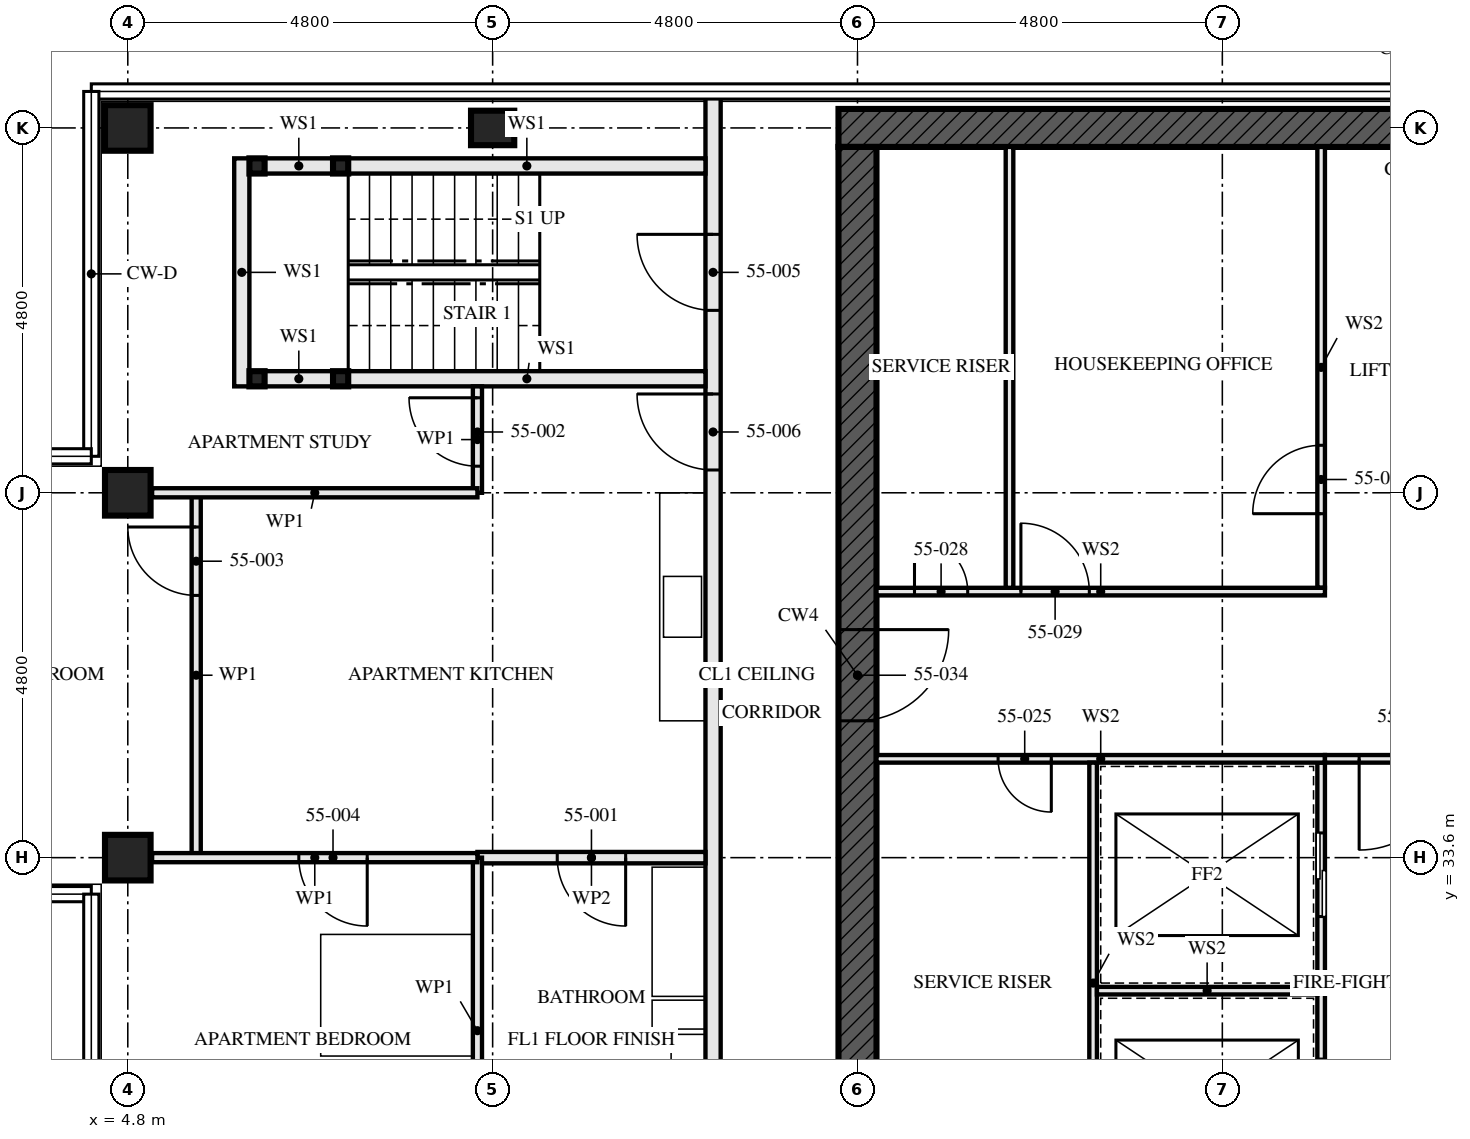
"""IFC4 building model, lengths in metres.
Left out: names, types, materials, properties, quantities, classifications, styles, units other than length and angle.
Written with IfcOpenShell. Run it as: python <this file> out.ifc"""

import sys

from ifc_helpers import new_model, si_unit, direction, frame, frame_2d, origin, origin_2d, place, context, subcontext, project, spatial, rectangle, hollow_rectangle, i_section, extrude, element, fill, save


model = new_model("IFC4")
c1 = context("Model", 3, precision=1e-05, world=origin(), true_north=direction((0.0, 1.0)))
c2 = subcontext(c1, "Body", "Model", "MODEL_VIEW")
j1 = project(units=[si_unit("LENGTHUNIT", "METRE"), si_unit("PLANEANGLEUNIT", "RADIAN")], contexts=[c1])
p1 = place(None, origin())
s1 = spatial("IfcSite", under=j1, at=p1, CompositionType="ELEMENT")
p2 = place(p1, origin())
s2 = spatial("IfcBuilding", under=s1, at=p2, CompositionType="ELEMENT")
p3 = place(p2, frame((0.0, 0.0, 201.5)))
s3 = spatial("IfcBuildingStorey", under=s2, at=p3, CompositionType="ELEMENT", Elevation=201.5)
for number, where, z_axis, x_axis in (
    (1, (4.8, 33.6, 0.0), (0.0, 0.0, 1.0), (0.0, 1.0, 0.0)),
    (2, (4.8, 38.4, 0.0), (0.0, 0.0, 1.0), (0.0, 1.0, 0.0)),
    (3, (4.8, 43.2, 0.0), (0.0, 0.0, 1.0), (0.0, 1.0, 0.0)),
):
    element("IfcColumn", number, at=place(p3, frame(where, z_axis=z_axis, x_axis=x_axis)), inside=s3, PredefinedType="COLUMN", context=c2, shape_type="SweptSolid", body=[
        extrude(hollow_rectangle(XDim=0.6, YDim=0.6, WallThickness=0.05, at=origin_2d()), origin(), (0.0, 0.0, 1.0), 3.5),
    ])
p4 = place(p3, frame((9.6, 43.2, 0.0), z_axis=(0.0, 0.0, 1.0), x_axis=(0.0, 1.0, 0.0)))
e4 = element("IfcColumn", 4, at=p4, inside=s3, PredefinedType="COLUMN", context=c2, shape_type="SweptSolid", body=[
    extrude(i_section(OverallWidth=0.454, OverallDepth=0.569, WebThickness=0.078, FlangeThickness=0.125, FilletRadius=0.015, at=origin_2d()), origin(), (0.0, 0.0, 1.0), 3.5),
])
p5 = place(p3, frame((29.05, 43.2, -0.17), z_axis=(0.0, 0.0, 1.0), x_axis=(-1.0, 0.0, 0.0)))
e5 = element("IfcWall", 5, at=p5, inside=s3, PredefinedType="SHEAR", context=c2, shape_type="SweptSolid", body=[
    extrude(rectangle(XDim=14.9, YDim=0.5, at=frame_2d((7.45, 0.0))), origin(), (0.0, 0.0, 1.0), 3.5),
])
p6 = place(p3, frame((14.4, 42.95, -0.17), z_axis=(0.0, 0.0, 1.0), x_axis=(0.0, -1.0, 0.0)))
e6 = element("IfcWall", 6, at=p6, inside=s3, PredefinedType="SHEAR", context=c2, shape_type="SweptSolid", body=[
    extrude(rectangle(XDim=13.9, YDim=0.5, at=frame_2d((6.95, 0.0))), origin(), (0.0, 0.0, 1.0), 3.5),
])
p7 = place(p6, frame((6.35, 0.0, 0.17)))
e7 = element("IfcOpeningElement", 7, at=p7, cuts=e6, PredefinedType="OPENING", context=c2, shape_type="SweptSolid", body=[
    extrude(rectangle(XDim=1.2, YDim=2.1, at=frame_2d((0.6, 1.05))), frame((0.0, 0.26, 0.0), z_axis=(0.0, -1.0, 0.0), x_axis=(1.0, 0.0, 0.0)), (0.0, 0.0, 1.0), 0.521),
])
for number, where, z_axis, x_axis in (
    (8, (6.5, 42.7, 0.0), (0.0, 0.0, 1.0), (1.0, 0.0, 0.0)),
    (9, (6.5, 39.9, 0.0), (0.0, 0.0, 1.0), (1.0, 0.0, 0.0)),
    (10, (7.6, 42.7, 0.0), (0.0, 0.0, 1.0), (1.0, 0.0, 0.0)),
    (11, (7.6, 39.9, 0.0), (0.0, 0.0, 1.0), (1.0, 0.0, 0.0)),
):
    element("IfcColumn", number, at=place(p3, frame(where, z_axis=z_axis, x_axis=x_axis)), inside=s3, PredefinedType="COLUMN", context=c2, shape_type="SweptSolid", body=[
        extrude(hollow_rectangle(XDim=0.2, YDim=0.2, WallThickness=0.008, at=origin_2d()), origin(), (0.0, 0.0, 1.0), 3.33),
    ])
p8 = place(p3, frame((6.6, 42.7, 0.0), z_axis=(0.0, 0.0, 1.0), x_axis=(1.0, 0.0, 0.0)))
e12 = element("IfcWall", 12, at=p8, inside=s3, PredefinedType="SOLIDWALL", context=c2, shape_type="SweptSolid", body=[
    extrude(rectangle(XDim=0.9, YDim=0.2, at=frame_2d((0.45, 0.0))), origin(), (0.0, 0.0, 1.0), 2.99),
])
p9 = place(p3, frame((7.7, 42.7, 0.0), z_axis=(0.0, 0.0, 1.0), x_axis=(1.0, 0.0, 0.0)))
e13 = element("IfcWall", 13, at=p9, inside=s3, PredefinedType="SOLIDWALL", context=c2, shape_type="SweptSolid", body=[
    extrude(rectangle(XDim=4.7, YDim=0.2, at=frame_2d((2.35, 0.0))), origin(), (0.0, 0.0, 1.0), 2.99),
])
p10 = place(p3, frame((6.6, 39.9, 0.0), z_axis=(0.0, 0.0, 1.0), x_axis=(1.0, 0.0, 0.0)))
e14 = element("IfcWall", 14, at=p10, inside=s3, PredefinedType="SOLIDWALL", context=c2, shape_type="SweptSolid", body=[
    extrude(rectangle(XDim=0.9, YDim=0.2, at=frame_2d((0.45, 0.0))), origin(), (0.0, 0.0, 1.0), 2.99),
])
p11 = place(p3, frame((7.7, 39.9, 0.0), z_axis=(0.0, 0.0, 1.0), x_axis=(1.0, 0.0, 0.0)))
e15 = element("IfcWall", 15, at=p11, inside=s3, PredefinedType="SOLIDWALL", context=c2, shape_type="SweptSolid", body=[
    extrude(rectangle(XDim=4.7, YDim=0.2, at=frame_2d((2.35, 0.0))), origin(), (0.0, 0.0, 1.0), 2.99),
])
p12 = place(p3, frame((6.3, 42.8, 0.0), z_axis=(0.0, 0.0, 1.0), x_axis=(0.0, -1.0, 0.0)))
e16 = element("IfcWall", 16, at=p12, inside=s3, PredefinedType="SOLIDWALL", context=c2, shape_type="SweptSolid", body=[
    extrude(rectangle(XDim=3.0, YDim=0.2, at=frame_2d((1.5, 0.0))), origin(), (0.0, 0.0, 1.0), 3.33),
])
p13 = place(p3, frame((9.4, 33.6, 0.0), z_axis=(0.0, 0.0, 1.0), x_axis=(1.0, 0.0, 0.0)))
e17 = element("IfcWall", 17, at=p13, inside=s3, PredefinedType="PARTITIONING", context=c2, shape_type="SweptSolid", body=[
    extrude(rectangle(XDim=3.0, YDim=0.15, at=frame_2d((1.5, 0.0))), origin(), (0.0, 0.0, 1.0), 2.55),
])
p14 = place(p13, frame((1.05, 0.0, 0.0)))
e18 = element("IfcOpeningElement", 18, at=p14, cuts=e17, PredefinedType="OPENING", context=c2, shape_type="SweptSolid", body=[
    extrude(rectangle(XDim=0.9, YDim=2.1, at=frame_2d((0.45, 1.05))), frame((0.0, 0.085, 0.0), z_axis=(0.0, -1.0, 0.0), x_axis=(1.0, 0.0, 0.0)), (0.0, 0.0, 1.0), 0.171),
])
p15 = place(p3, frame((9.4, 39.8, 0.0), z_axis=(0.0, 0.0, 1.0), x_axis=(0.0, -1.0, 0.0)))
e19 = element("IfcWall", 19, at=p15, inside=s3, PredefinedType="PARTITIONING", context=c2, shape_type="SweptSolid", body=[
    extrude(rectangle(XDim=1.4, YDim=0.12, at=frame_2d((0.7, 0.0))), origin(), (0.0, 0.0, 1.0), 3.33),
])
p16 = place(p15, frame((0.15, 0.0, 0.0)))
e20 = element("IfcOpeningElement", 20, at=p16, cuts=e19, PredefinedType="OPENING", context=c2, shape_type="SweptSolid", body=[
    extrude(rectangle(XDim=0.9, YDim=2.1, at=frame_2d((0.45, 1.05))), frame((0.0, 0.071, 0.0), z_axis=(0.0, -1.0, 0.0), x_axis=(1.0, 0.0, 0.0)), (0.0, 0.0, 1.0), 0.141),
])
p17 = place(p3, frame((5.7, 38.4, 0.0), z_axis=(0.0, 0.0, 1.0), x_axis=(0.0, -1.0, 0.0)))
e21 = element("IfcWall", 21, at=p17, inside=s3, PredefinedType="PARTITIONING", context=c2, shape_type="SweptSolid", body=[
    extrude(rectangle(XDim=4.8, YDim=0.12, at=frame_2d((2.4, 0.0))), origin(), (0.0, 0.0, 1.0), 3.33),
])
p18 = place(p17, frame((0.45, 0.0, 0.0)))
e22 = element("IfcOpeningElement", 22, at=p18, cuts=e21, PredefinedType="OPENING", context=c2, shape_type="SweptSolid", body=[
    extrude(rectangle(XDim=0.9, YDim=2.1, at=frame_2d((0.45, 1.05))), frame((0.0, 0.071, 0.0), z_axis=(0.0, -1.0, 0.0), x_axis=(1.0, 0.0, 0.0)), (0.0, 0.0, 1.0), 0.141),
])
p19 = place(p3, frame((9.4, 33.6, 0.0), z_axis=(0.0, 0.0, 1.0), x_axis=(0.0, -1.0, 0.0)))
e23 = element("IfcWall", 23, at=p19, inside=s3, PredefinedType="PARTITIONING", context=c2, shape_type="SweptSolid", body=[
    extrude(rectangle(XDim=4.553, YDim=0.12, at=frame_2d((2.276, 0.0))), origin(), (0.0, 0.0, 1.0), 3.33),
])
p20 = place(p3, frame((5.12, 38.4, 0.0), z_axis=(0.0, 0.0, 1.0), x_axis=(1.0, 0.0, 0.0)))
e24 = element("IfcWall", 24, at=p20, inside=s3, PredefinedType="PARTITIONING", context=c2, shape_type="SweptSolid", body=[
    extrude(rectangle(XDim=4.28, YDim=0.12, at=frame_2d((2.14, 0.0))), origin(), (0.0, 0.0, 1.0), 2.55),
])
p21 = place(p3, frame((5.12, 33.6, 0.0), z_axis=(0.0, 0.0, 1.0), x_axis=(1.0, 0.0, 0.0)))
e25 = element("IfcWall", 25, at=p21, inside=s3, PredefinedType="PARTITIONING", context=c2, shape_type="SweptSolid", body=[
    extrude(rectangle(XDim=4.28, YDim=0.12, at=frame_2d((2.14, 0.0))), origin(), (0.0, 0.0, 1.0), 2.55),
])
p22 = place(p21, frame((1.93, 0.0, 0.0)))
e26 = element("IfcOpeningElement", 26, at=p22, cuts=e25, PredefinedType="OPENING", context=c2, shape_type="SweptSolid", body=[
    extrude(rectangle(XDim=0.9, YDim=2.1, at=frame_2d((0.45, 1.05))), frame((0.0, 0.071, 0.0), z_axis=(0.0, -1.0, 0.0), x_axis=(1.0, 0.0, 0.0)), (0.0, 0.0, 1.0), 0.141),
])
p23 = place(p3, frame((12.5, 43.655, 0.0), z_axis=(0.0, 0.0, 1.0), x_axis=(0.0, -1.0, 0.0)))
e27 = element("IfcWall", 27, at=p23, inside=s3, PredefinedType="PARTITIONING", context=c2, shape_type="SweptSolid", body=[
    extrude(rectangle(XDim=15.31, YDim=0.2, at=frame_2d((7.655, 0.0))), origin(), (0.0, 0.0, 1.0), 2.32),
])
p24 = place(p23, frame((1.855, 0.0, 0.0)))
e28 = element("IfcOpeningElement", 28, at=p24, cuts=e27, PredefinedType="OPENING", context=c2, shape_type="SweptSolid", body=[
    extrude(rectangle(XDim=1.0, YDim=2.1, at=frame_2d((0.5, 1.05))), frame((0.0, 0.111, 0.0), z_axis=(0.0, -1.0, 0.0), x_axis=(1.0, 0.0, 0.0)), (0.0, 0.0, 1.0), 0.221),
])
p25 = place(p23, frame((3.955, 0.0, 0.0)))
e29 = element("IfcOpeningElement", 29, at=p25, cuts=e27, PredefinedType="OPENING", context=c2, shape_type="SweptSolid", body=[
    extrude(rectangle(XDim=1.0, YDim=2.1, at=frame_2d((0.5, 1.05))), frame((0.0, 0.111, 0.0), z_axis=(0.0, -1.0, 0.0), x_axis=(1.0, 0.0, 0.0)), (0.0, 0.0, 1.0), 0.221),
])
p26 = place(p3, frame((16.4, 37.15, 0.0), z_axis=(0.0, 0.0, 1.0), x_axis=(0.0, 1.0, 0.0)))
e30 = element("IfcWall", 30, at=p26, inside=s3, PredefinedType="SOLIDWALL", context=c2, shape_type="SweptSolid", body=[
    extrude(rectangle(XDim=5.8, YDim=0.1, at=frame_2d((2.9, 0.0))), origin(), (0.0, 0.0, 1.0), 3.33),
])
p27 = place(p3, frame((20.5, 29.05, 0.0), z_axis=(0.0, 0.0, 1.0), x_axis=(0.0, 1.0, 0.0)))
e31 = element("IfcWall", 31, at=p27, inside=s3, PredefinedType="SOLIDWALL", context=c2, shape_type="SweptSolid", body=[
    extrude(rectangle(XDim=5.8, YDim=0.1, at=frame_2d((2.9, 0.0))), origin(), (0.0, 0.0, 1.0), 3.33),
])
p28 = place(p27, frame((0.8, 0.0, 0.0)))
e32 = element("IfcOpeningElement", 32, at=p28, cuts=e31, PredefinedType="OPENING", context=c2, shape_type="SweptSolid", body=[
    extrude(rectangle(XDim=1.1, YDim=2.3, at=frame_2d((0.55, 1.15))), frame((0.0, 0.061, 0.0), z_axis=(0.0, -1.0, 0.0), x_axis=(1.0, 0.0, 0.0)), (0.0, 0.0, 1.0), 0.121),
])
p29 = place(p27, frame((3.775, 0.0, 0.0)))
e33 = element("IfcOpeningElement", 33, at=p29, cuts=e31, PredefinedType="OPENING", context=c2, shape_type="SweptSolid", body=[
    extrude(rectangle(XDim=1.1, YDim=2.3, at=frame_2d((0.55, 1.15))), frame((0.0, 0.061, 0.0), z_axis=(0.0, -1.0, 0.0), x_axis=(1.0, 0.0, 0.0)), (0.0, 0.0, 1.0), 0.121),
])
p30 = place(p3, frame((20.5, 37.15, 0.0), z_axis=(0.0, 0.0, 1.0), x_axis=(0.0, 1.0, 0.0)))
e34 = element("IfcWall", 34, at=p30, inside=s3, PredefinedType="SOLIDWALL", context=c2, shape_type="SweptSolid", body=[
    extrude(rectangle(XDim=5.8, YDim=0.1, at=frame_2d((2.9, 0.0))), origin(), (0.0, 0.0, 1.0), 3.33),
])
p31 = place(p30, frame((0.975, 0.0, 0.0)))
e35 = element("IfcOpeningElement", 35, at=p31, cuts=e34, PredefinedType="OPENING", context=c2, shape_type="SweptSolid", body=[
    extrude(rectangle(XDim=0.9, YDim=2.1, at=frame_2d((0.45, 1.05))), frame((0.0, 0.061, 0.0), z_axis=(0.0, -1.0, 0.0), x_axis=(1.0, 0.0, 0.0)), (0.0, 0.0, 1.0), 0.121),
])
p32 = place(p3, frame((14.65, 34.9, 0.0), z_axis=(0.0, 0.0, 1.0), x_axis=(1.0, 0.0, 0.0)))
e36 = element("IfcWall", 36, at=p32, inside=s3, PredefinedType="SOLIDWALL", context=c2, shape_type="SweptSolid", body=[
    extrude(rectangle(XDim=5.9, YDim=0.1, at=frame_2d((2.95, 0.0))), origin(), (0.0, 0.0, 1.0), 3.33),
])
p33 = place(p32, frame((1.6, 0.0, 0.0)))
e37 = element("IfcOpeningElement", 37, at=p33, cuts=e36, PredefinedType="OPENING", context=c2, shape_type="SweptSolid", body=[
    extrude(rectangle(XDim=0.7, YDim=2.1, at=frame_2d((0.35, 1.05))), frame((0.0, 0.061, 0.0), z_axis=(0.0, -1.0, 0.0), x_axis=(1.0, 0.0, 0.0)), (0.0, 0.0, 1.0), 0.121),
])
p34 = place(p3, frame((14.65, 37.1, 0.0), z_axis=(0.0, 0.0, 1.0), x_axis=(1.0, 0.0, 0.0)))
e38 = element("IfcWall", 38, at=p34, inside=s3, PredefinedType="SOLIDWALL", context=c2, shape_type="SweptSolid", body=[
    extrude(rectangle(XDim=5.9, YDim=0.1, at=frame_2d((2.95, 0.0))), origin(), (0.0, 0.0, 1.0), 3.33),
])
p35 = place(p34, frame((0.5, 0.0, 0.0)))
e39 = element("IfcOpeningElement", 39, at=p35, cuts=e38, PredefinedType="OPENING", context=c2, shape_type="SweptSolid", body=[
    extrude(rectangle(XDim=0.7, YDim=2.1, at=frame_2d((0.35, 1.05))), frame((0.0, 0.061, 0.0), z_axis=(0.0, -1.0, 0.0), x_axis=(1.0, 0.0, 0.0)), (0.0, 0.0, 1.0), 0.121),
])
p36 = place(p34, frame((1.9, 0.0, 0.0)))
e40 = element("IfcOpeningElement", 40, at=p36, cuts=e38, PredefinedType="OPENING", context=c2, shape_type="SweptSolid", body=[
    extrude(rectangle(XDim=0.9, YDim=2.1, at=frame_2d((0.45, 1.05))), frame((0.0, 0.061, 0.0), z_axis=(0.0, -1.0, 0.0), x_axis=(1.0, 0.0, 0.0)), (0.0, 0.0, 1.0), 0.121),
])
p37 = place(p3, frame((20.55, 34.9, 0.0), z_axis=(0.0, 0.0, 1.0), x_axis=(1.0, 0.0, 0.0)))
e41 = element("IfcWall", 41, at=p37, inside=s3, PredefinedType="SOLIDWALL", context=c2, shape_type="SweptSolid", body=[
    extrude(rectangle(XDim=2.5, YDim=0.1, at=frame_2d((1.25, 0.0))), origin(), (0.0, 0.0, 1.0), 3.33),
])
p38 = place(p37, frame((0.45, 0.0, 0.0)))
e42 = element("IfcOpeningElement", 42, at=p38, cuts=e41, PredefinedType="OPENING", context=c2, shape_type="SweptSolid", body=[
    extrude(rectangle(XDim=1.2, YDim=2.1, at=frame_2d((0.6, 1.05))), frame((0.0, 0.061, 0.0), z_axis=(0.0, -1.0, 0.0), x_axis=(1.0, 0.0, 0.0)), (0.0, 0.0, 1.0), 0.121),
])
p39 = place(p3, frame((17.5, 29.05, 0.0), z_axis=(0.0, 0.0, 1.0), x_axis=(0.0, 1.0, 0.0)))
e43 = element("IfcWall", 43, at=p39, inside=s3, PredefinedType="SOLIDWALL", context=c2, shape_type="SweptSolid", body=[
    extrude(rectangle(XDim=5.8, YDim=0.1, at=frame_2d((2.9, 0.0))), origin(), (0.0, 0.0, 1.0), 3.33),
])
p40 = place(p3, frame((17.55, 31.85, 0.0), z_axis=(0.0, 0.0, 1.0), x_axis=(1.0, 0.0, 0.0)))
e44 = element("IfcWall", 44, at=p40, inside=s3, PredefinedType="SOLIDWALL", context=c2, shape_type="SweptSolid", body=[
    extrude(rectangle(XDim=2.9, YDim=0.1, at=frame_2d((1.45, 0.0))), origin(), (0.0, 0.0, 1.0), 3.33),
])
p41 = place(p14, frame((0.9, 0.0, 0.0), z_axis=(0.0, 0.0, 1.0), x_axis=(-1.0, 0.0, 0.0)))
e45 = element("IfcDoor", 45, at=p41, inside=s3, OperationType="SINGLE_SWING_RIGHT", PredefinedType="DOOR", context=c2, shape_type="SweptSolid", body=[
    extrude(rectangle(XDim=0.9, YDim=2.1, at=frame_2d((0.45, 1.05))), frame((0.0, 0.022, 0.0), z_axis=(0.0, -1.0, 0.0), x_axis=(1.0, 0.0, 0.0)), (0.0, 0.0, 1.0), 0.044),
])
fill(e18, e45)
p42 = place(p16, frame((0.9, 0.0, 0.0), z_axis=(0.0, 0.0, 1.0), x_axis=(-1.0, 0.0, 0.0)))
e46 = element("IfcDoor", 46, at=p42, inside=s3, OperationType="SINGLE_SWING_LEFT", PredefinedType="DOOR", context=c2, shape_type="SweptSolid", body=[
    extrude(rectangle(XDim=0.9, YDim=2.1, at=frame_2d((0.45, 1.05))), frame((0.0, 0.022, 0.0), z_axis=(0.0, -1.0, 0.0), x_axis=(1.0, 0.0, 0.0)), (0.0, 0.0, 1.0), 0.044),
])
fill(e20, e46)
p43 = place(p18, frame((0.9, 0.0, 0.0), z_axis=(0.0, 0.0, 1.0), x_axis=(-1.0, 0.0, 0.0)))
e47 = element("IfcDoor", 47, at=p43, inside=s3, OperationType="SINGLE_SWING_LEFT", PredefinedType="DOOR", context=c2, shape_type="SweptSolid", body=[
    extrude(rectangle(XDim=0.9, YDim=2.1, at=frame_2d((0.45, 1.05))), frame((0.0, 0.022, 0.0), z_axis=(0.0, -1.0, 0.0), x_axis=(1.0, 0.0, 0.0)), (0.0, 0.0, 1.0), 0.044),
])
fill(e22, e47)
p44 = place(p22, frame((0.9, 0.0, 0.0), z_axis=(0.0, 0.0, 1.0), x_axis=(-1.0, 0.0, 0.0)))
e48 = element("IfcDoor", 48, at=p44, inside=s3, OperationType="SINGLE_SWING_RIGHT", PredefinedType="DOOR", context=c2, shape_type="SweptSolid", body=[
    extrude(rectangle(XDim=0.9, YDim=2.1, at=frame_2d((0.45, 1.05))), frame((0.0, 0.022, 0.0), z_axis=(0.0, -1.0, 0.0), x_axis=(1.0, 0.0, 0.0)), (0.0, 0.0, 1.0), 0.044),
])
fill(e26, e48)
p45 = place(p24, frame((1.0, 0.0, 0.0), z_axis=(0.0, 0.0, 1.0), x_axis=(-1.0, 0.0, 0.0)))
e49 = element("IfcDoor", 49, at=p45, inside=s3, OperationType="SINGLE_SWING_LEFT", PredefinedType="DOOR", context=c2, shape_type="SweptSolid", body=[
    extrude(rectangle(XDim=1.0, YDim=2.1, at=frame_2d((0.5, 1.05))), frame((0.0, 0.032, 0.0), z_axis=(0.0, -1.0, 0.0), x_axis=(1.0, 0.0, 0.0)), (0.0, 0.0, 1.0), 0.064),
])
fill(e28, e49)
p46 = place(p25, frame((1.0, 0.0, 0.0), z_axis=(0.0, 0.0, 1.0), x_axis=(-1.0, 0.0, 0.0)))
e50 = element("IfcDoor", 50, at=p46, inside=s3, OperationType="SINGLE_SWING_LEFT", PredefinedType="DOOR", context=c2, shape_type="SweptSolid", body=[
    extrude(rectangle(XDim=1.0, YDim=2.1, at=frame_2d((0.5, 1.05))), frame((0.0, 0.027, 0.0), z_axis=(0.0, -1.0, 0.0), x_axis=(1.0, 0.0, 0.0)), (0.0, 0.0, 1.0), 0.054),
])
fill(e29, e50)
p47 = place(p28, origin())
e51 = element("IfcDoor", 51, at=p47, inside=s3, OperationType="SLIDING_TO_LEFT", PredefinedType="DOOR", context=c2, shape_type="SweptSolid", body=[
    extrude(rectangle(XDim=1.1, YDim=2.3, at=frame_2d((0.55, 1.15))), frame((0.0, 0.05, 0.0), z_axis=(0.0, -1.0, 0.0), x_axis=(1.0, 0.0, 0.0)), (0.0, 0.0, 1.0), 0.1),
])
fill(e32, e51)
p48 = place(p29, origin())
e52 = element("IfcDoor", 52, at=p48, inside=s3, OperationType="SLIDING_TO_LEFT", PredefinedType="DOOR", context=c2, shape_type="SweptSolid", body=[
    extrude(rectangle(XDim=1.1, YDim=2.3, at=frame_2d((0.55, 1.15))), frame((0.0, 0.05, 0.0), z_axis=(0.0, -1.0, 0.0), x_axis=(1.0, 0.0, 0.0)), (0.0, 0.0, 1.0), 0.1),
])
fill(e33, e52)
p49 = place(p31, origin())
e53 = element("IfcDoor", 53, at=p49, inside=s3, OperationType="SINGLE_SWING_RIGHT", PredefinedType="DOOR", context=c2, shape_type="SweptSolid", body=[
    extrude(rectangle(XDim=0.9, YDim=2.1, at=frame_2d((0.45, 1.05))), frame((0.0, 0.027, 0.0), z_axis=(0.0, -1.0, 0.0), x_axis=(1.0, 0.0, 0.0)), (0.0, 0.0, 1.0), 0.054),
])
fill(e35, e53)
p50 = place(p33, frame((0.7, 0.0, 0.0), z_axis=(0.0, 0.0, 1.0), x_axis=(-1.0, 0.0, 0.0)))
e54 = element("IfcDoor", 54, at=p50, inside=s3, OperationType="SINGLE_SWING_RIGHT", PredefinedType="DOOR", context=c2, shape_type="SweptSolid", body=[
    extrude(rectangle(XDim=0.7, YDim=2.1, at=frame_2d((0.35, 1.05))), frame((0.0, 0.027, 0.0), z_axis=(0.0, -1.0, 0.0), x_axis=(1.0, 0.0, 0.0)), (0.0, 0.0, 1.0), 0.054),
])
fill(e37, e54)
p51 = place(p35, origin())
e55 = element("IfcDoor", 55, at=p51, inside=s3, OperationType="SINGLE_SWING_RIGHT", PredefinedType="DOOR", context=c2, shape_type="SweptSolid", body=[
    extrude(rectangle(XDim=0.7, YDim=2.1, at=frame_2d((0.35, 1.05))), frame((0.0, 0.027, 0.0), z_axis=(0.0, -1.0, 0.0), x_axis=(1.0, 0.0, 0.0)), (0.0, 0.0, 1.0), 0.054),
])
fill(e39, e55)
p52 = place(p36, origin())
e56 = element("IfcDoor", 56, at=p52, inside=s3, OperationType="SINGLE_SWING_RIGHT", PredefinedType="DOOR", context=c2, shape_type="SweptSolid", body=[
    extrude(rectangle(XDim=0.9, YDim=2.1, at=frame_2d((0.45, 1.05))), frame((0.0, 0.027, 0.0), z_axis=(0.0, -1.0, 0.0), x_axis=(1.0, 0.0, 0.0)), (0.0, 0.0, 1.0), 0.054),
])
fill(e40, e56)
p53 = place(p38, frame((1.2, 0.0, 0.0), z_axis=(0.0, 0.0, 1.0), x_axis=(-1.0, 0.0, 0.0)))
e57 = element("IfcDoor", 57, at=p53, inside=s3, OperationType="SINGLE_SWING_LEFT", PredefinedType="DOOR", context=c2, shape_type="SweptSolid", body=[
    extrude(rectangle(XDim=1.2, YDim=2.1, at=frame_2d((0.6, 1.05))), frame((0.0, 0.027, 0.0), z_axis=(0.0, -1.0, 0.0), x_axis=(1.0, 0.0, 0.0)), (0.0, 0.0, 1.0), 0.054),
])
fill(e42, e57)
p54 = place(p7, origin())
e58 = element("IfcDoor", 58, at=p54, inside=s3, OperationType="SINGLE_SWING_LEFT", PredefinedType="DOOR", context=c2, shape_type="SweptSolid", body=[
    extrude(rectangle(XDim=1.2, YDim=2.1, at=frame_2d((0.6, 1.05))), frame((0.0, 0.027, 0.0), z_axis=(0.0, -1.0, 0.0), x_axis=(1.0, 0.0, 0.0)), (0.0, 0.0, 1.0), 0.054),
])
fill(e7, e58)
save(model, sys.argv[1])
